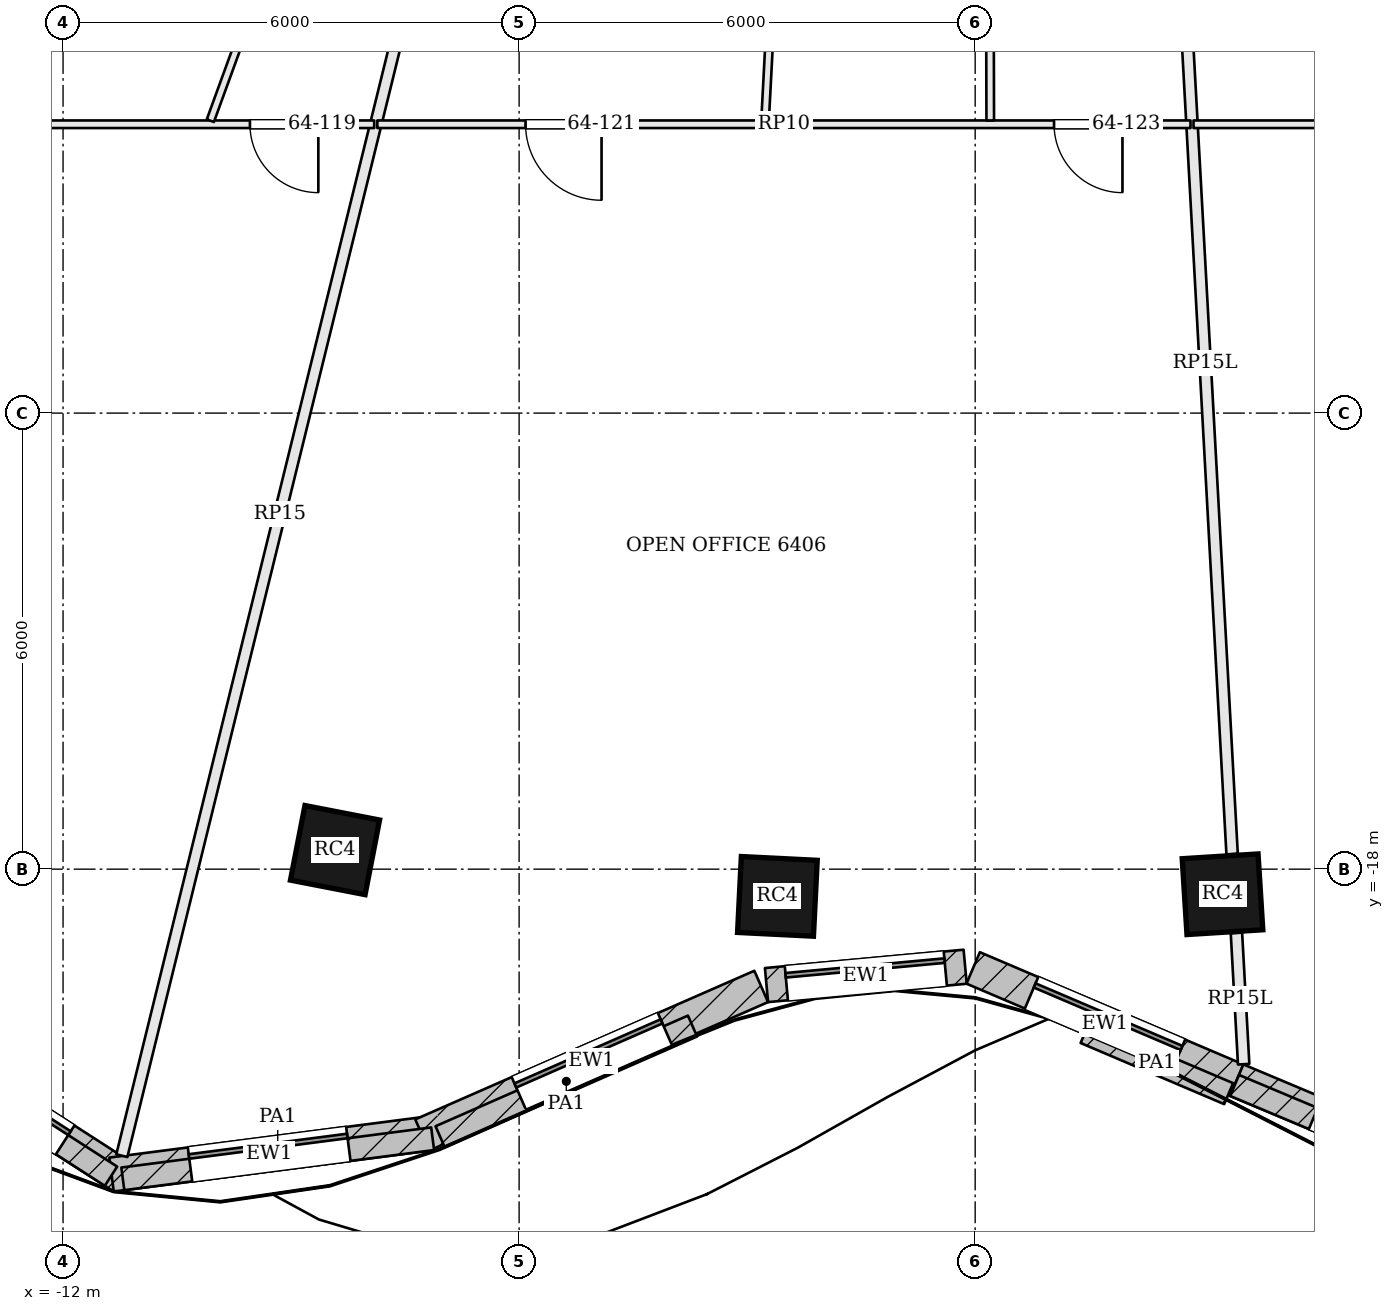
"""IFC4 building model, lengths in metres.
Left out: names, types, materials, properties, quantities, classifications, styles, units other than length and angle.
Written with IfcOpenShell. Run it as: python <this file> out.ifc"""

import sys

from ifc_helpers import new_model, si_unit, direction, frame, frame_2d, origin, origin_2d, place, context, subcontext, project, spatial, rectangle, extrude, element, fill, save


model = new_model("IFC4")
c1 = context("Model", 3, precision=1e-05, world=origin(), true_north=direction((0.0, 1.0)))
c2 = subcontext(c1, "Body", "Model", "MODEL_VIEW")
j1 = project(units=[si_unit("LENGTHUNIT", "METRE"), si_unit("PLANEANGLEUNIT", "RADIAN")], contexts=[c1])
p1 = place(None, origin())
s1 = spatial("IfcSite", under=j1, at=p1, CompositionType="ELEMENT")
p2 = place(p1, origin())
s2 = spatial("IfcBuilding", under=s1, at=p2, CompositionType="ELEMENT")
p3 = place(p2, frame((0.0, 0.0, 260.4)))
s3 = spatial("IfcBuildingStorey", under=s2, at=p3, CompositionType="ELEMENT", Elevation=260.4)
for number, where, z_axis, x_axis in (
    (1, (-8.422, -17.749, 0.0), (0.0, 0.0, 1.0), (0.982, -0.191, 0.0)),
    (2, (-2.602, -18.358, 0.0), (0.0, 0.0, 1.0), (0.999, -0.05, 0.0)),
    (3, (3.254, -18.33, 0.0), (0.0, 0.0, 1.0), (0.998, 0.063, 0.0)),
):
    element("IfcColumn", number, at=place(p3, frame(where, z_axis=z_axis, x_axis=x_axis)), inside=s3, PredefinedType="COLUMN", context=c2, shape_type="SweptSolid", body=[
        extrude(rectangle(XDim=1.0, YDim=1.0, at=origin_2d()), origin(), (0.0, 0.0, 1.0), 3.1),
    ])
p4 = place(p3, frame((-14.499, -19.935, 0.0), z_axis=(0.0, 0.0, 1.0), x_axis=(0.84080910763, -0.541331732422, 0.0)))
e4 = element("IfcWall", 4, at=p4, inside=s3, PredefinedType="SOLIDWALL", context=c2, shape_type="SweptSolid", body=[
    extrude(rectangle(XDim=3.911, YDim=0.45, at=frame_2d((1.955, 0.0))), origin(), (0.0, 0.0, 1.0), 3.6),
])
p5 = place(p4, frame((0.905, 0.0, 0.9)))
e5 = element("IfcOpeningElement", 5, at=p5, cuts=e4, PredefinedType="OPENING", context=c2, shape_type="SweptSolid", body=[
    extrude(rectangle(XDim=2.1, YDim=1.8, at=frame_2d((1.05, 0.9))), frame((0.0, 0.235, 0.0), z_axis=(0.0, -1.0, 0.0), x_axis=(1.0, 0.0, 0.0)), (0.0, 0.0, 1.0), 0.47),
])
p6 = place(p3, frame((-11.362, -22.018, 0.0), z_axis=(0.0, 0.0, 1.0), x_axis=(0.991724958022, 0.128380713645, 0.0)))
e6 = element("IfcWall", 6, at=p6, inside=s3, PredefinedType="SOLIDWALL", context=c2, shape_type="SweptSolid", body=[
    extrude(rectangle(XDim=4.182, YDim=0.45, at=frame_2d((2.091, 0.0))), origin(), (0.0, 0.0, 1.0), 3.6),
])
p7 = place(p6, frame((1.041, 0.0, 0.9)))
e7 = element("IfcOpeningElement", 7, at=p7, cuts=e6, PredefinedType="OPENING", context=c2, shape_type="SweptSolid", body=[
    extrude(rectangle(XDim=2.1, YDim=1.8, at=frame_2d((1.05, 0.9))), frame((0.0, 0.235, 0.0), z_axis=(0.0, -1.0, 0.0), x_axis=(1.0, 0.0, 0.0)), (0.0, 0.0, 1.0), 0.47),
])
p8 = place(p3, frame((-7.276, -21.498, 0.0), z_axis=(0.0, 0.0, 1.0), x_axis=(0.915872941312, 0.401468249519, 0.0)))
e8 = element("IfcWall", 8, at=p8, inside=s3, PredefinedType="SOLIDWALL", context=c2, shape_type="SweptSolid", body=[
    extrude(rectangle(XDim=4.87, YDim=0.45, at=frame_2d((2.435, 0.0))), origin(), (0.0, 0.0, 1.0), 3.6),
])
p9 = place(p8, frame((1.385, 0.0, 0.9)))
e9 = element("IfcOpeningElement", 9, at=p9, cuts=e8, PredefinedType="OPENING", context=c2, shape_type="SweptSolid", body=[
    extrude(rectangle(XDim=2.1, YDim=1.8, at=frame_2d((1.05, 0.9))), frame((0.0, 0.235, 0.0), z_axis=(0.0, -1.0, 0.0), x_axis=(1.0, 0.0, 0.0)), (0.0, 0.0, 1.0), 0.47),
])
p10 = place(p3, frame((-2.745, -19.525, 0.0), z_axis=(0.0, 0.0, 1.0), x_axis=(0.995768774275, 0.091894222771, 0.0)))
e10 = element("IfcWall", 10, at=p10, inside=s3, PredefinedType="SOLIDWALL", context=c2, shape_type="SweptSolid", body=[
    extrude(rectangle(XDim=2.625, YDim=0.45, at=frame_2d((1.312, 0.0))), origin(), (0.0, 0.0, 1.0), 3.6),
])
p11 = place(p10, frame((0.262, 0.0, 0.9)))
e11 = element("IfcOpeningElement", 11, at=p11, cuts=e10, PredefinedType="OPENING", context=c2, shape_type="SweptSolid", body=[
    extrude(rectangle(XDim=2.1, YDim=1.8, at=frame_2d((1.05, 0.9))), frame((0.0, 0.235, 0.0), z_axis=(0.0, -1.0, 0.0), x_axis=(1.0, 0.0, 0.0)), (0.0, 0.0, 1.0), 0.47),
])
p12 = place(p3, frame((-0.026, -19.299, 0.0), z_axis=(0.0, 0.0, 1.0), x_axis=(0.920040408927, -0.391823488245, 0.0)))
e12 = element("IfcWall", 12, at=p12, inside=s3, PredefinedType="SOLIDWALL", context=c2, shape_type="SweptSolid", body=[
    extrude(rectangle(XDim=3.77, YDim=0.45, at=frame_2d((1.885, 0.0))), origin(), (0.0, 0.0, 1.0), 3.6),
])
p13 = place(p12, frame((0.835, 0.0, 0.9)))
e13 = element("IfcOpeningElement", 13, at=p13, cuts=e12, PredefinedType="OPENING", context=c2, shape_type="SweptSolid", body=[
    extrude(rectangle(XDim=2.1, YDim=1.8, at=frame_2d((1.05, 0.9))), frame((0.0, 0.235, 0.0), z_axis=(0.0, -1.0, 0.0), x_axis=(1.0, 0.0, 0.0)), (0.0, 0.0, 1.0), 0.47),
])
p14 = place(p3, frame((3.441, -20.776, 0.0), z_axis=(0.0, 0.0, 1.0), x_axis=(0.921988121387, -0.387218160758, 0.0)))
e14 = element("IfcWall", 14, at=p14, inside=s3, PredefinedType="SOLIDWALL", context=c2, shape_type="SweptSolid", body=[
    extrude(rectangle(XDim=4.347, YDim=0.45, at=frame_2d((2.173, 0.0))), origin(), (0.0, 0.0, 1.0), 3.6),
])
p15 = place(p14, frame((1.123, 0.0, 0.9)))
e15 = element("IfcOpeningElement", 15, at=p15, cuts=e14, PredefinedType="OPENING", context=c2, shape_type="SweptSolid", body=[
    extrude(rectangle(XDim=2.1, YDim=1.8, at=frame_2d((1.05, 0.9))), frame((0.0, 0.235, 0.0), z_axis=(0.0, -1.0, 0.0), x_axis=(1.0, 0.0, 0.0)), (0.0, 0.0, 1.0), 0.47),
])
p16 = place(p3, frame((-14.465, -20.046, 3.9), z_axis=(0.0, 0.0, 1.0), x_axis=(0.840809836002, -0.541330601095, 0.0)))
e16 = element("IfcWall", 16, at=p16, inside=s3, PredefinedType="PARAPET", context=c2, shape_type="SweptSolid", body=[
    extrude(rectangle(XDim=3.682, YDim=0.3, at=frame_2d((1.841, 0.0))), origin(), (0.0, 0.0, 1.0), 1.1),
])
p17 = place(p3, frame((-11.214, -22.074, 3.9), z_axis=(0.0, 0.0, 1.0), x_axis=(0.991727449614, 0.128361464939, 0.0)))
e17 = element("IfcWall", 17, at=p17, inside=s3, PredefinedType="PARAPET", context=c2, shape_type="SweptSolid", body=[
    extrude(rectangle(XDim=4.11, YDim=0.3, at=frame_2d((2.055, 0.0))), origin(), (0.0, 0.0, 1.0), 1.1),
])
p18 = place(p3, frame((-7.039, -21.519, 3.9), z_axis=(0.0, 0.0, 1.0), x_axis=(0.915895948183, 0.401415759659, 0.0)))
e18 = element("IfcWall", 18, at=p18, inside=s3, PredefinedType="PARAPET", context=c2, shape_type="SweptSolid", body=[
    extrude(rectangle(XDim=3.625, YDim=0.3, at=frame_2d((1.813, 0.0))), origin(), (0.0, 0.0, 1.0), 1.1),
])
p19 = place(p3, frame((1.446, -20.149, 3.9), z_axis=(0.0, 0.0, 1.0), x_axis=(0.920058903695, -0.391780057854, 0.0)))
e19 = element("IfcWall", 19, at=p19, inside=s3, PredefinedType="PARAPET", context=c2, shape_type="SweptSolid", body=[
    extrude(rectangle(XDim=2.053, YDim=0.3, at=frame_2d((1.027, 0.0))), origin(), (0.0, 0.0, 1.0), 1.1),
])
p20 = place(p3, frame((3.413, -20.846, 3.9), z_axis=(0.0, 0.0, 1.0), x_axis=(0.921981693349, -0.387233465921, 0.0)))
e20 = element("IfcWall", 20, at=p20, inside=s3, PredefinedType="PARAPET", context=c2, shape_type="SweptSolid", body=[
    extrude(rectangle(XDim=4.229, YDim=0.3, at=frame_2d((2.114, 0.0))), origin(), (0.0, 0.0, 1.0), 1.1),
])
p21 = place(p3, frame((-11.227, -21.769, 0.0), z_axis=(0.0, 0.0, 1.0), x_axis=(0.239061175175, 0.971004507983, 0.0)))
e21 = element("IfcWall", 21, at=p21, inside=s3, PredefinedType="PARTITIONING", context=c2, shape_type="SweptSolid", body=[
    extrude(rectangle(XDim=17.401, YDim=0.15, at=frame_2d((8.701, 0.0))), origin(), (0.0, 0.0, 1.0), 2.984),
])
p22 = place(p3, frame((3.532, -20.566, 0.0), z_axis=(0.0, 0.0, 1.0), x_axis=(-0.054930375168, 0.998490187175, 0.0)))
e22 = element("IfcWall", 22, at=p22, inside=s3, PredefinedType="PARTITIONING", context=c2, shape_type="SweptSolid", body=[
    extrude(rectangle(XDim=1.729, YDim=0.15, at=frame_2d((0.865, 0.0))), origin(), (0.0, 0.0, 1.0), 2.58),
])
p23 = place(p3, frame((3.38, -17.801, 0.0), z_axis=(0.0, 0.0, 1.0), x_axis=(-0.054879866406, 0.998492964554, 0.0)))
e23 = element("IfcWall", 23, at=p23, inside=s3, PredefinedType="PARTITIONING", context=c2, shape_type="SweptSolid", body=[
    extrude(rectangle(XDim=12.946, YDim=0.15, at=frame_2d((6.473, 0.0))), origin(), (0.0, 0.0, 1.0), 2.58),
])
p24 = place(p3, frame((-7.906, -8.2, 0.0), z_axis=(0.0, 0.0, 1.0), x_axis=(-1.0, 0.0, 0.0)))
e24 = element("IfcWall", 24, at=p24, inside=s3, PredefinedType="PARTITIONING", context=c2, shape_type="SweptSolid", body=[
    extrude(rectangle(XDim=10.243, YDim=0.1, at=frame_2d((5.122, 0.0))), origin(), (0.0, 0.0, 1.0), 2.984),
])
p25 = place(p24, frame((0.735, 0.0, 0.0)))
e25 = element("IfcOpeningElement", 25, at=p25, cuts=e24, PredefinedType="OPENING", context=c2, shape_type="SweptSolid", body=[
    extrude(rectangle(XDim=0.9, YDim=2.1, at=frame_2d((0.45, 1.05))), frame((0.0, 0.06, 0.0), z_axis=(0.0, -1.0, 0.0), x_axis=(1.0, 0.0, 0.0)), (0.0, 0.0, 1.0), 0.12),
])
p26 = place(p3, frame((-8.866, -4.871, 0.0), z_axis=(0.0, 0.0, 1.0), x_axis=(-0.342292896457, -0.939593301932, 0.0)))
e26 = element("IfcWall", 26, at=p26, inside=s3, PredefinedType="PARTITIONING", context=c2, shape_type="SweptSolid", body=[
    extrude(rectangle(XDim=3.493, YDim=0.1, at=frame_2d((1.747, 0.0))), origin(), (0.0, 0.0, 1.0), 2.984),
])
p27 = place(p3, frame((2.833, -8.2, 0.0), z_axis=(0.0, 0.0, 1.0), x_axis=(-1.0, 0.0, 0.0)))
e27 = element("IfcWall", 27, at=p27, inside=s3, PredefinedType="PARTITIONING", context=c2, shape_type="SweptSolid", body=[
    extrude(rectangle(XDim=10.698, YDim=0.1, at=frame_2d((5.349, 0.0))), origin(), (0.0, 0.0, 1.0), 2.984),
])
p28 = place(p27, frame((7.748, 0.0, 0.0)))
e28 = element("IfcOpeningElement", 28, at=p28, cuts=e27, PredefinedType="OPENING", context=c2, shape_type="SweptSolid", body=[
    extrude(rectangle(XDim=1.0, YDim=2.1, at=frame_2d((0.5, 1.05))), frame((0.0, 0.06, 0.0), z_axis=(0.0, -1.0, 0.0), x_axis=(1.0, 0.0, 0.0)), (0.0, 0.0, 1.0), 0.12),
])
p29 = place(p27, frame((0.895, 0.0, 0.0)))
e29 = element("IfcOpeningElement", 29, at=p29, cuts=e27, PredefinedType="OPENING", context=c2, shape_type="SweptSolid", body=[
    extrude(rectangle(XDim=0.9, YDim=2.1, at=frame_2d((0.45, 1.05))), frame((0.0, 0.06, 0.0), z_axis=(0.0, -1.0, 0.0), x_axis=(1.0, 0.0, 0.0)), (0.0, 0.0, 1.0), 0.12),
])
p30 = place(p3, frame((-2.592, -4.875, 0.0), z_axis=(0.0, 0.0, 1.0), x_axis=(-0.05240645469, -0.998625837592, 0.0)))
e30 = element("IfcWall", 30, at=p30, inside=s3, PredefinedType="PARTITIONING", context=c2, shape_type="SweptSolid", body=[
    extrude(rectangle(XDim=3.28, YDim=0.1, at=frame_2d((1.64, 0.0))), origin(), (0.0, 0.0, 1.0), 2.984),
])
p31 = place(p3, frame((0.19, -4.875, 0.0), z_axis=(0.0, 0.0, 1.0), x_axis=(0.002534657133, -0.999996787751, 0.0)))
e31 = element("IfcWall", 31, at=p31, inside=s3, PredefinedType="PARTITIONING", context=c2, shape_type="SweptSolid", body=[
    extrude(rectangle(XDim=3.275, YDim=0.1, at=frame_2d((1.637, 0.0))), origin(), (0.0, 0.0, 1.0), 2.984),
])
p32 = place(p3, frame((12.001, -8.2, 0.0), z_axis=(0.0, 0.0, 1.0), x_axis=(-1.0, 0.0, 0.0)))
e32 = element("IfcWall", 32, at=p32, inside=s3, PredefinedType="PARTITIONING", context=c2, shape_type="SweptSolid", body=[
    extrude(rectangle(XDim=9.128, YDim=0.1, at=frame_2d((4.564, 0.0))), origin(), (0.0, 0.0, 1.0), 2.984),
])
p33 = place(p32, frame((6.09, 0.0, 0.0)))
e33 = element("IfcOpeningElement", 33, at=p33, cuts=e32, PredefinedType="OPENING", context=c2, shape_type="SweptSolid", body=[
    extrude(rectangle(XDim=1.0, YDim=2.1, at=frame_2d((0.5, 1.05))), frame((0.0, 0.06, 0.0), z_axis=(0.0, -1.0, 0.0), x_axis=(1.0, 0.0, 0.0)), (0.0, 0.0, 1.0), 0.12),
])
p34 = place(p5, origin())
e34 = element("IfcWindow", 34, at=p34, inside=s3, PartitioningType="SINGLE_PANEL", PredefinedType="WINDOW", context=c2, shape_type="SweptSolid", body=[
    extrude(rectangle(XDim=2.1, YDim=1.8, at=frame_2d((1.05, 0.9))), frame((0.0, 0.135, 0.0), z_axis=(0.0, -1.0, 0.0), x_axis=(1.0, 0.0, 0.0)), (0.0, 0.0, 1.0), 0.06),
])
fill(e5, e34)
p35 = place(p7, origin())
e35 = element("IfcWindow", 35, at=p35, inside=s3, PartitioningType="SINGLE_PANEL", PredefinedType="WINDOW", context=c2, shape_type="SweptSolid", body=[
    extrude(rectangle(XDim=2.1, YDim=1.8, at=frame_2d((1.05, 0.9))), frame((0.0, 0.135, 0.0), z_axis=(0.0, -1.0, 0.0), x_axis=(1.0, 0.0, 0.0)), (0.0, 0.0, 1.0), 0.06),
])
fill(e7, e35)
p36 = place(p9, origin())
e36 = element("IfcWindow", 36, at=p36, inside=s3, PartitioningType="SINGLE_PANEL", PredefinedType="WINDOW", context=c2, shape_type="SweptSolid", body=[
    extrude(rectangle(XDim=2.1, YDim=1.8, at=frame_2d((1.05, 0.9))), frame((0.0, 0.135, 0.0), z_axis=(0.0, -1.0, 0.0), x_axis=(1.0, 0.0, 0.0)), (0.0, 0.0, 1.0), 0.06),
])
fill(e9, e36)
p37 = place(p11, origin())
e37 = element("IfcWindow", 37, at=p37, inside=s3, PartitioningType="SINGLE_PANEL", PredefinedType="WINDOW", context=c2, shape_type="SweptSolid", body=[
    extrude(rectangle(XDim=2.1, YDim=1.8, at=frame_2d((1.05, 0.9))), frame((0.0, 0.135, 0.0), z_axis=(0.0, -1.0, 0.0), x_axis=(1.0, 0.0, 0.0)), (0.0, 0.0, 1.0), 0.06),
])
fill(e11, e37)
p38 = place(p13, origin())
e38 = element("IfcWindow", 38, at=p38, inside=s3, PartitioningType="SINGLE_PANEL", PredefinedType="WINDOW", context=c2, shape_type="SweptSolid", body=[
    extrude(rectangle(XDim=2.1, YDim=1.8, at=frame_2d((1.05, 0.9))), frame((0.0, 0.135, 0.0), z_axis=(0.0, -1.0, 0.0), x_axis=(1.0, 0.0, 0.0)), (0.0, 0.0, 1.0), 0.06),
])
fill(e13, e38)
p39 = place(p25, origin())
e39 = element("IfcDoor", 39, at=p39, inside=s3, OperationType="SINGLE_SWING_LEFT", PredefinedType="DOOR", context=c2, shape_type="SweptSolid", body=[
    extrude(rectangle(XDim=0.9, YDim=2.1, at=frame_2d((0.45, 1.05))), frame((0.0, 0.025, 0.0), z_axis=(0.0, -1.0, 0.0), x_axis=(1.0, 0.0, 0.0)), (0.0, 0.0, 1.0), 0.05),
])
fill(e25, e39)
p40 = place(p28, origin())
e40 = element("IfcDoor", 40, at=p40, inside=s3, OperationType="SINGLE_SWING_LEFT", PredefinedType="DOOR", context=c2, shape_type="SweptSolid", body=[
    extrude(rectangle(XDim=1.0, YDim=2.1, at=frame_2d((0.5, 1.05))), frame((0.0, 0.025, 0.0), z_axis=(0.0, -1.0, 0.0), x_axis=(1.0, 0.0, 0.0)), (0.0, 0.0, 1.0), 0.05),
])
fill(e28, e40)
p41 = place(p29, origin())
e41 = element("IfcDoor", 41, at=p41, inside=s3, OperationType="SINGLE_SWING_LEFT", PredefinedType="DOOR", context=c2, shape_type="SweptSolid", body=[
    extrude(rectangle(XDim=0.9, YDim=2.1, at=frame_2d((0.45, 1.05))), frame((0.0, 0.025, 0.0), z_axis=(0.0, -1.0, 0.0), x_axis=(1.0, 0.0, 0.0)), (0.0, 0.0, 1.0), 0.05),
])
fill(e29, e41)
save(model, sys.argv[1])
